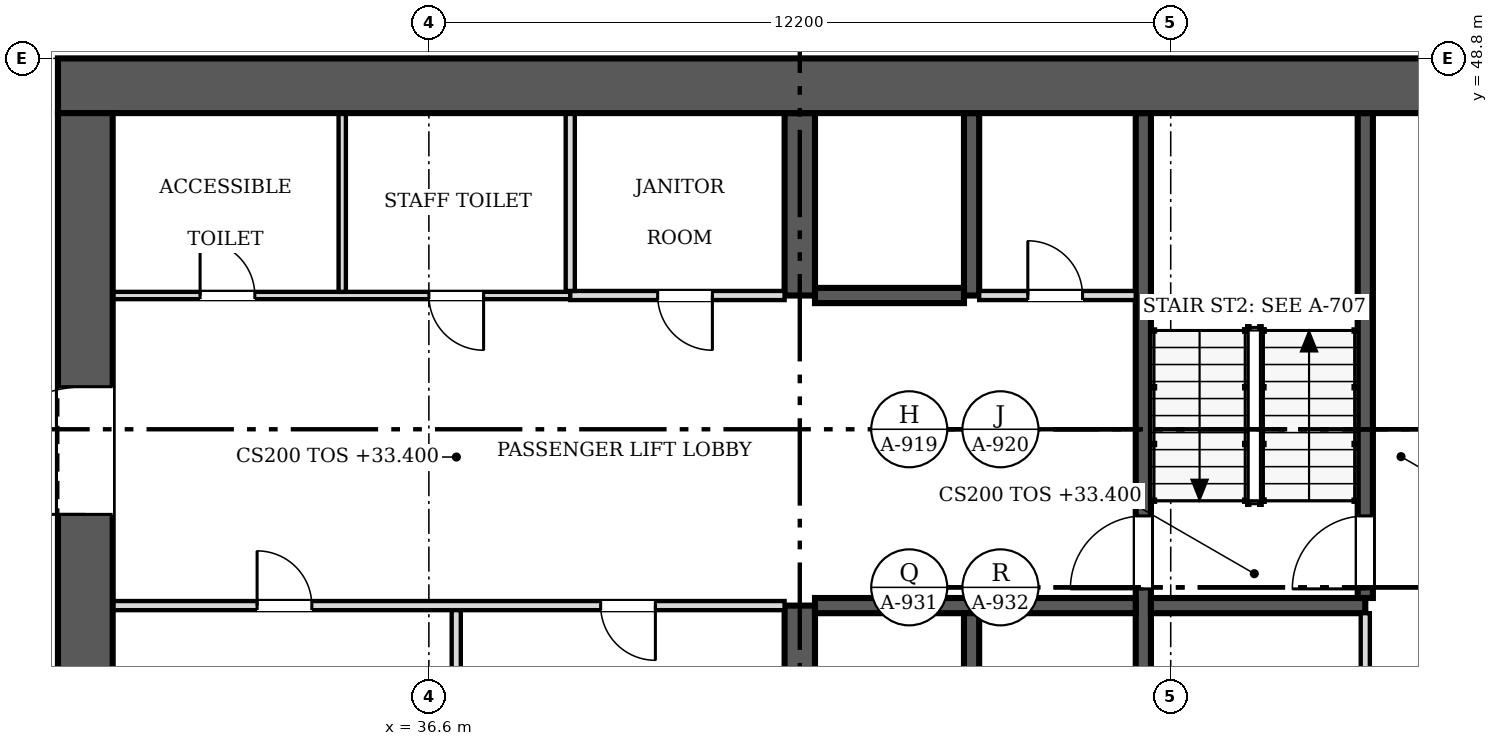
"""IFC4 building model, lengths in metres.
Left out: names, types, materials, properties, quantities, classifications, styles, units other than length and angle.
Written with IfcOpenShell. Run it as: python <this file> out.ifc"""

import sys

from ifc_helpers import new_model, si_unit, direction, frame, frame_2d, origin, place, context, subcontext, project, spatial, rectangle, extrude, source, transform, mapped, element, fill, save


model = new_model("IFC4")
c1 = context("Model", 3, precision=1e-05, world=origin(), true_north=direction((0.0, 1.0)))
c2 = subcontext(c1, "Body", "Model", "MODEL_VIEW")
j1 = project(units=[si_unit("LENGTHUNIT", "METRE"), si_unit("PLANEANGLEUNIT", "RADIAN")], contexts=[c1])
p1 = place(None, origin())
s1 = spatial("IfcSite", under=j1, at=p1, CompositionType="ELEMENT")
p2 = place(p1, origin())
s2 = spatial("IfcBuilding", under=s1, at=p2, CompositionType="ELEMENT")
p3 = place(p2, frame((0.0, 0.0, 33.4)))
s3 = spatial("IfcBuildingStorey", under=s2, at=p3, CompositionType="ELEMENT", Elevation=33.4)
p4 = place(p3, frame((30.95, 25.3, 0.0), z_axis=(0.0, 0.0, 1.0), x_axis=(0.0, 1.0, 0.0)))
e1 = element("IfcWall", 1, at=p4, inside=s3, PredefinedType="SHEAR", context=c2, shape_type="SweptSolid", body=[
    extrude(rectangle(XDim=22.6, YDim=0.9, at=frame_2d((11.3, 0.0))), origin(), (0.0, 0.0, 1.0), 3.8),
])
m1 = source(origin(), c2, "Body", "SweptSolid", [
    extrude(rectangle(XDim=2.1, YDim=2.4, at=frame_2d((1.05, 1.2))), frame((0.0, 0.46, 0.0), z_axis=(0.0, -1.0, 0.0), x_axis=(1.0, 0.0, 0.0)), (0.0, 0.0, 1.0), 0.92),
])
p5 = place(p4, frame((4.5, 0.0, 0.0)))
e2 = element("IfcOpeningElement", 2, at=p5, cuts=e1, PredefinedType="OPENING", context=c2, shape_type="MappedRepresentation", body=[
    mapped(m1, transform((0.0, 0.0, 0.0), scale=1.0)),
])
p6 = place(p4, frame((16.0, 0.0, 0.0)))
e3 = element("IfcOpeningElement", 3, at=p6, cuts=e1, PredefinedType="OPENING", context=c2, shape_type="MappedRepresentation", body=[
    mapped(m1, transform((0.0, 0.0, 0.0), scale=1.0)),
])
p7 = place(p3, frame((30.5, 48.35, 0.0), z_axis=(0.0, 0.0, 1.0), x_axis=(1.0, 0.0, 0.0)))
e4 = element("IfcWall", 4, at=p7, inside=s3, PredefinedType="SHEAR", context=c2, shape_type="SweptSolid", body=[
    extrude(rectangle(XDim=24.4, YDim=0.9, at=frame_2d((12.2, 0.0))), origin(), (0.0, 0.0, 1.0), 3.8),
])
p8 = place(p3, frame((42.7, 36.85, 0.0), z_axis=(0.0, 0.0, 1.0), x_axis=(0.0, 1.0, 0.0)))
e5 = element("IfcWall", 5, at=p8, inside=s3, PredefinedType="SHEAR", context=c2, shape_type="SweptSolid", body=[
    extrude(rectangle(XDim=2.95, YDim=0.5, at=frame_2d((1.475, 0.0))), origin(), (0.0, 0.0, 1.0), 3.8),
])
p9 = place(p3, frame((42.7, 44.9, 0.0), z_axis=(0.0, 0.0, 1.0), x_axis=(0.0, 1.0, 0.0)))
e6 = element("IfcWall", 6, at=p9, inside=s3, PredefinedType="SHEAR", context=c2, shape_type="SweptSolid", body=[
    extrude(rectangle(XDim=3.0, YDim=0.5, at=frame_2d((1.5, 0.0))), origin(), (0.0, 0.0, 1.0), 3.8),
])
p10 = place(p3, frame((48.35, 47.9, 0.0), z_axis=(0.0, 0.0, 1.0), x_axis=(0.0, -1.0, 0.0)))
e7 = element("IfcWall", 7, at=p10, inside=s3, PredefinedType="SOLIDWALL", context=c2, shape_type="SweptSolid", body=[
    extrude(rectangle(XDim=11.05, YDim=0.25, at=frame_2d((5.525, 0.0))), origin(), (0.0, 0.0, 1.0), 3.8),
])
m2 = source(origin(), c2, "Body", "SweptSolid", [
    extrude(rectangle(XDim=1.2, YDim=2.1, at=frame_2d((0.6, 1.05))), frame((0.0, 0.135, 0.0), z_axis=(0.0, -1.0, 0.0), x_axis=(1.0, 0.0, 0.0)), (0.0, 0.0, 1.0), 0.27),
])
p11 = place(p10, frame((6.625, 0.0, 0.0)))
e8 = element("IfcOpeningElement", 8, at=p11, cuts=e7, PredefinedType="OPENING", context=c2, shape_type="MappedRepresentation", body=[
    mapped(m2, transform((0.0, 0.0, 0.0), scale=1.0)),
])
p12 = place(p3, frame((42.95, 39.8, 0.0), z_axis=(0.0, 0.0, 1.0), x_axis=(1.0, 0.0, 0.0)))
e9 = element("IfcWall", 9, at=p12, inside=s3, PredefinedType="SOLIDWALL", context=c2, shape_type="SweptSolid", body=[
    extrude(rectangle(XDim=5.275, YDim=0.25, at=frame_2d((2.638, 0.0))), origin(), (0.0, 0.0, 1.0), 3.8),
])
p13 = place(p3, frame((48.475, 39.8, 0.0), z_axis=(0.0, 0.0, 1.0), x_axis=(1.0, 0.0, 0.0)))
e10 = element("IfcWall", 10, at=p13, inside=s3, PredefinedType="SOLIDWALL", context=c2, shape_type="SweptSolid", body=[
    extrude(rectangle(XDim=3.525, YDim=0.25, at=frame_2d((1.762, 0.0))), origin(), (0.0, 0.0, 1.0), 3.8),
])
p14 = place(p3, frame((52.0, 39.925, 0.0), z_axis=(0.0, 0.0, 1.0), x_axis=(0.0, 1.0, 0.0)))
e11 = element("IfcWall", 11, at=p14, inside=s3, PredefinedType="SOLIDWALL", context=c2, shape_type="SweptSolid", body=[
    extrude(rectangle(XDim=7.975, YDim=0.25, at=frame_2d((3.987, 0.0))), origin(), (0.0, 0.0, 1.0), 3.8),
])
p15 = place(p14, frame((0.15, 0.0, 0.0)))
e12 = element("IfcOpeningElement", 12, at=p15, cuts=e11, PredefinedType="OPENING", context=c2, shape_type="MappedRepresentation", body=[
    mapped(m2, transform((0.0, 0.0, 0.0), scale=1.0)),
])
p16 = place(p3, frame((45.525, 36.85, 0.0), z_axis=(0.0, 0.0, 1.0), x_axis=(0.0, 1.0, 0.0)))
e13 = element("IfcWall", 13, at=p16, inside=s3, PredefinedType="SOLIDWALL", context=c2, shape_type="SweptSolid", body=[
    extrude(rectangle(XDim=2.825, YDim=0.25, at=frame_2d((1.413, 0.0))), origin(), (0.0, 0.0, 1.0), 3.8),
])
p17 = place(p3, frame((45.525, 44.9, 0.0), z_axis=(0.0, 0.0, 1.0), x_axis=(0.0, 1.0, 0.0)))
e14 = element("IfcWall", 14, at=p17, inside=s3, PredefinedType="SOLIDWALL", context=c2, shape_type="SweptSolid", body=[
    extrude(rectangle(XDim=3.0, YDim=0.25, at=frame_2d((1.5, 0.0))), origin(), (0.0, 0.0, 1.0), 3.8),
])
p18 = place(p3, frame((42.95, 44.9, 0.0), z_axis=(0.0, 0.0, 1.0), x_axis=(1.0, 0.0, 0.0)))
e15 = element("IfcWall", 15, at=p18, inside=s3, PredefinedType="SOLIDWALL", context=c2, shape_type="SweptSolid", body=[
    extrude(rectangle(XDim=2.45, YDim=0.25, at=frame_2d((1.225, 0.0))), origin(), (0.0, 0.0, 1.0), 3.8),
])
p19 = place(p3, frame((42.45, 39.8, 0.0), z_axis=(0.0, 0.0, 1.0), x_axis=(-1.0, 0.0, 0.0)))
e16 = element("IfcWall", 16, at=p19, inside=s3, PredefinedType="PARTITIONING", context=c2, shape_type="SweptSolid", body=[
    extrude(rectangle(XDim=11.05, YDim=0.15, at=frame_2d((5.525, 0.0))), origin(), (0.0, 0.0, 1.0), 3.6),
])
m3 = source(origin(), c2, "Body", "SweptSolid", [
    extrude(rectangle(XDim=0.9, YDim=2.1, at=frame_2d((0.45, 1.05))), frame((0.0, 0.085, 0.0), z_axis=(0.0, -1.0, 0.0), x_axis=(1.0, 0.0, 0.0)), (0.0, 0.0, 1.0), 0.17),
])
p20 = place(p19, frame((7.775, 0.0, 0.0)))
e17 = element("IfcOpeningElement", 17, at=p20, cuts=e16, PredefinedType="OPENING", context=c2, shape_type="MappedRepresentation", body=[
    mapped(m3, transform((0.0, 0.0, 0.0), scale=1.0)),
])
p21 = place(p19, frame((2.125, 0.0, 0.0)))
e18 = element("IfcOpeningElement", 18, at=p21, cuts=e16, PredefinedType="OPENING", context=c2, shape_type="MappedRepresentation", body=[
    mapped(m3, transform((0.0, 0.0, 0.0), scale=1.0)),
])
p22 = place(p3, frame((31.4, 44.9, 0.0), z_axis=(0.0, 0.0, 1.0), x_axis=(1.0, 0.0, 0.0)))
e19 = element("IfcWall", 19, at=p22, inside=s3, PredefinedType="PARTITIONING", context=c2, shape_type="SweptSolid", body=[
    extrude(rectangle(XDim=7.525, YDim=0.12, at=frame_2d((3.763, 0.0))), origin(), (0.0, 0.0, 1.0), 3.6),
])
m4 = source(origin(), c2, "Body", "SweptSolid", [
    extrude(rectangle(XDim=0.9, YDim=2.1, at=frame_2d((0.45, 1.05))), frame((0.0, 0.07, 0.0), z_axis=(0.0, -1.0, 0.0), x_axis=(1.0, 0.0, 0.0)), (0.0, 0.0, 1.0), 0.14),
])
p23 = place(p22, frame((1.438, 0.0, 0.0)))
e20 = element("IfcOpeningElement", 20, at=p23, cuts=e19, PredefinedType="OPENING", context=c2, shape_type="MappedRepresentation", body=[
    mapped(m4, transform((0.0, 0.0, 0.0), scale=1.0)),
])
p24 = place(p22, frame((5.2, 0.0, 0.0)))
e21 = element("IfcOpeningElement", 21, at=p24, cuts=e19, PredefinedType="OPENING", context=c2, shape_type="MappedRepresentation", body=[
    mapped(m4, transform((0.0, 0.0, 0.0), scale=1.0)),
])
p25 = place(p3, frame((52.0, 33.525, 0.0), z_axis=(0.0, 0.0, 1.0), x_axis=(0.0, 1.0, 0.0)))
e22 = element("IfcWall", 22, at=p25, inside=s3, PredefinedType="PARTITIONING", context=c2, shape_type="SweptSolid", body=[
    extrude(rectangle(XDim=6.15, YDim=0.15, at=frame_2d((3.075, 0.0))), origin(), (0.0, 0.0, 1.0), 3.6),
])
p26 = place(p25, frame((1.025, 0.0, 0.0)))
e23 = element("IfcOpeningElement", 23, at=p26, cuts=e22, PredefinedType="OPENING", context=c2, shape_type="MappedRepresentation", body=[
    mapped(m3, transform((0.0, 0.0, 0.0), scale=1.0)),
])
p27 = place(p3, frame((38.925, 44.9, 0.0), z_axis=(0.0, 0.0, 1.0), x_axis=(1.0, 0.0, 0.0)))
e24 = element("IfcWall", 24, at=p27, inside=s3, PredefinedType="PARTITIONING", context=c2, shape_type="SweptSolid", body=[
    extrude(rectangle(XDim=3.525, YDim=0.15, at=frame_2d((1.762, 0.0))), origin(), (0.0, 0.0, 1.0), 3.6),
])
p28 = place(p27, frame((1.438, 0.0, 0.0)))
e25 = element("IfcOpeningElement", 25, at=p28, cuts=e24, PredefinedType="OPENING", context=c2, shape_type="MappedRepresentation", body=[
    mapped(m3, transform((0.0, 0.0, 0.0), scale=1.0)),
])
p29 = place(p3, frame((37.05, 36.85, 0.0), z_axis=(0.0, 0.0, 1.0), x_axis=(0.0, 1.0, 0.0)))
e26 = element("IfcWall", 26, at=p29, inside=s3, PredefinedType="PARTITIONING", context=c2, shape_type="SweptSolid", body=[
    extrude(rectangle(XDim=2.875, YDim=0.15, at=frame_2d((1.438, 0.0))), origin(), (0.0, 0.0, 1.0), 3.6),
])
p30 = place(p3, frame((35.175, 44.96, 0.0), z_axis=(0.0, 0.0, 1.0), x_axis=(0.0, 1.0, 0.0)))
e27 = element("IfcWall", 27, at=p30, inside=s3, PredefinedType="PARTITIONING", context=c2, shape_type="SweptSolid", body=[
    extrude(rectangle(XDim=2.94, YDim=0.12, at=frame_2d((1.47, 0.0))), origin(), (0.0, 0.0, 1.0), 3.6),
])
p31 = place(p3, frame((38.925, 44.975, 0.0), z_axis=(0.0, 0.0, 1.0), x_axis=(0.0, 1.0, 0.0)))
e28 = element("IfcWall", 28, at=p31, inside=s3, PredefinedType="PARTITIONING", context=c2, shape_type="SweptSolid", body=[
    extrude(rectangle(XDim=2.925, YDim=0.15, at=frame_2d((1.462, 0.0))), origin(), (0.0, 0.0, 1.0), 3.6),
])
p32 = place(p3, frame((45.65, 44.9, 0.0), z_axis=(0.0, 0.0, 1.0), x_axis=(1.0, 0.0, 0.0)))
e29 = element("IfcWall", 29, at=p32, inside=s3, PredefinedType="PARTITIONING", context=c2, shape_type="SweptSolid", body=[
    extrude(rectangle(XDim=2.575, YDim=0.15, at=frame_2d((1.288, 0.0))), origin(), (0.0, 0.0, 1.0), 3.6),
])
p33 = place(p32, frame((0.8, 0.0, 0.0)))
e30 = element("IfcOpeningElement", 30, at=p33, cuts=e29, PredefinedType="OPENING", context=c2, shape_type="MappedRepresentation", body=[
    mapped(m3, transform((0.0, 0.0, 0.0), scale=1.0)),
])
m5 = source(origin(), c2, "Body", "SweptSolid", [
    extrude(rectangle(XDim=2.1, YDim=2.4, at=frame_2d((1.05, 1.2))), frame((0.0, 0.025, 0.0), z_axis=(0.0, -1.0, 0.0), x_axis=(1.0, 0.0, 0.0)), (0.0, 0.0, 1.0), 0.05),
])
p34 = place(p6, origin())
e31 = element("IfcDoor", 31, at=p34, inside=s3, OperationType="DOUBLE_DOOR_SINGLE_SWING", PredefinedType="DOOR", context=c2, shape_type="MappedRepresentation", body=[
    mapped(m5, transform((0.0, 0.0, 0.0), scale=1.0)),
])
fill(e3, e31)
m6 = source(origin(), c2, "Body", "SweptSolid", [
    extrude(rectangle(XDim=1.2, YDim=2.1, at=frame_2d((0.6, 1.05))), frame((0.0, 0.025, 0.0), z_axis=(0.0, -1.0, 0.0), x_axis=(1.0, 0.0, 0.0)), (0.0, 0.0, 1.0), 0.05),
])
p35 = place(p11, origin())
e32 = element("IfcDoor", 32, at=p35, inside=s3, OperationType="SINGLE_SWING_RIGHT", PredefinedType="DOOR", context=c2, shape_type="MappedRepresentation", body=[
    mapped(m6, transform((0.0, 0.0, 0.0), scale=1.0)),
])
fill(e8, e32)
p36 = place(p15, origin())
e33 = element("IfcDoor", 33, at=p36, inside=s3, OperationType="SINGLE_SWING_LEFT", PredefinedType="DOOR", context=c2, shape_type="MappedRepresentation", body=[
    mapped(m6, transform((0.0, 0.0, 0.0), scale=1.0)),
])
fill(e12, e33)
m7 = source(origin(), c2, "Body", "SweptSolid", [
    extrude(rectangle(XDim=0.9, YDim=2.1, at=frame_2d((0.45, 1.05))), frame((0.0, 0.025, 0.0), z_axis=(0.0, -1.0, 0.0), x_axis=(1.0, 0.0, 0.0)), (0.0, 0.0, 1.0), 0.05),
])
p37 = place(p20, origin())
e34 = element("IfcDoor", 34, at=p37, inside=s3, OperationType="SINGLE_SWING_RIGHT", PredefinedType="DOOR", context=c2, shape_type="MappedRepresentation", body=[
    mapped(m7, transform((0.0, 0.0, 0.0), scale=1.0)),
])
fill(e17, e34)
p38 = place(p21, origin())
e35 = element("IfcDoor", 35, at=p38, inside=s3, OperationType="SINGLE_SWING_LEFT", PredefinedType="DOOR", context=c2, shape_type="MappedRepresentation", body=[
    mapped(m7, transform((0.0, 0.0, 0.0), scale=1.0)),
])
fill(e18, e35)
p39 = place(p23, origin())
e36 = element("IfcDoor", 36, at=p39, inside=s3, OperationType="SINGLE_SWING_LEFT", PredefinedType="DOOR", context=c2, shape_type="MappedRepresentation", body=[
    mapped(m7, transform((0.0, 0.0, 0.0), scale=1.0)),
])
fill(e20, e36)
p40 = place(p24, origin())
e37 = element("IfcDoor", 37, at=p40, inside=s3, OperationType="SINGLE_SWING_RIGHT", PredefinedType="DOOR", context=c2, shape_type="MappedRepresentation", body=[
    mapped(m7, transform((0.0, 0.0, 0.0), scale=1.0)),
])
fill(e21, e37)
p41 = place(p28, origin())
e38 = element("IfcDoor", 38, at=p41, inside=s3, OperationType="SINGLE_SWING_RIGHT", PredefinedType="DOOR", context=c2, shape_type="MappedRepresentation", body=[
    mapped(m7, transform((0.0, 0.0, 0.0), scale=1.0)),
])
fill(e25, e38)
p42 = place(p33, origin())
e39 = element("IfcDoor", 39, at=p42, inside=s3, OperationType="SINGLE_SWING_LEFT", PredefinedType="DOOR", context=c2, shape_type="MappedRepresentation", body=[
    mapped(m7, transform((0.0, 0.0, 0.0), scale=1.0)),
])
fill(e30, e39)
save(model, sys.argv[1])
